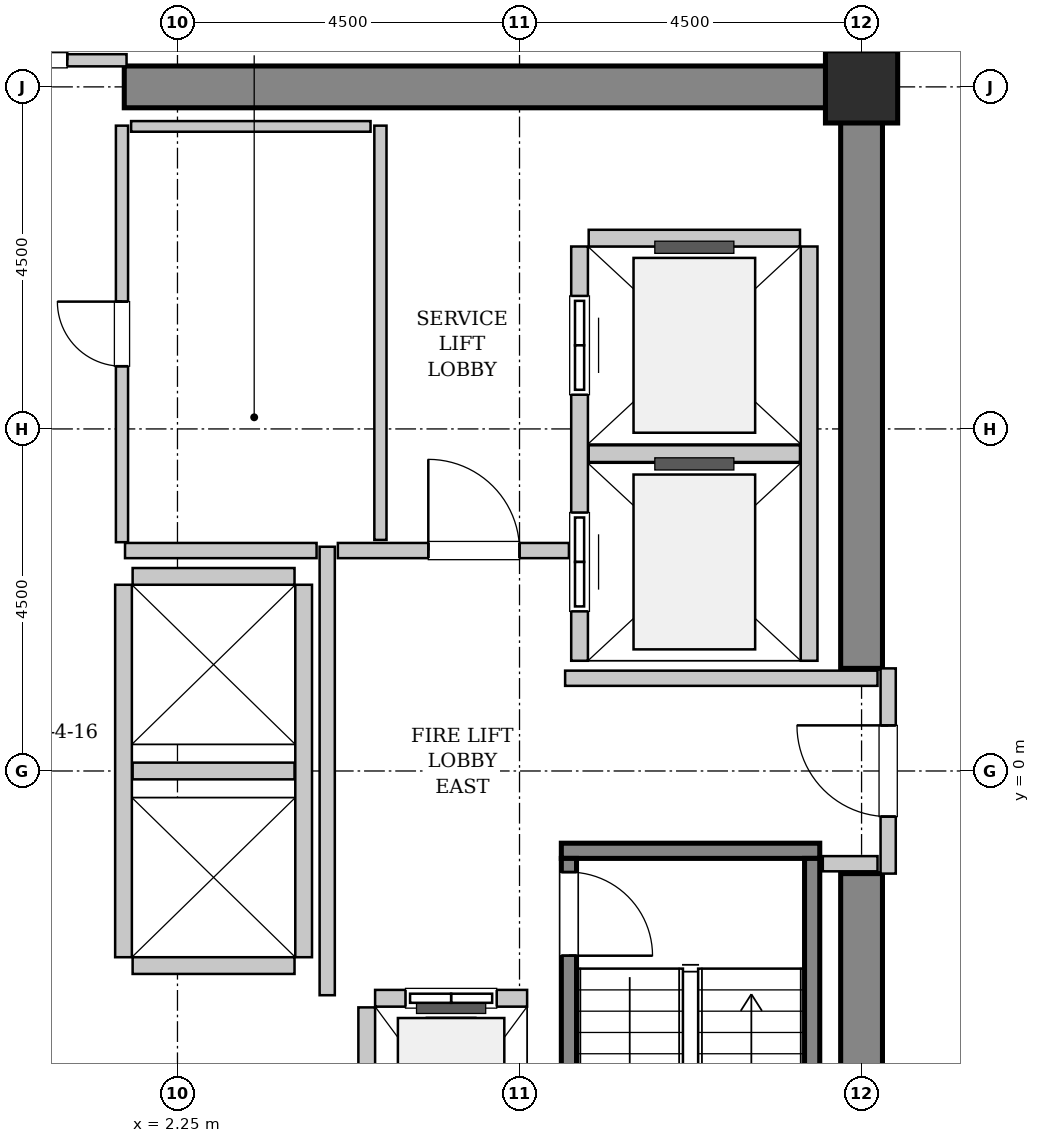
"""IFC4 building model, lengths in metres.
Left out: names, types, materials, properties, quantities, classifications, styles, units other than length and angle.
Written with IfcOpenShell. Run it as: python <this file> out.ifc"""

import sys

from ifc_helpers import new_model, si_unit, direction, frame, frame_2d, origin, origin_2d, place, context, subcontext, project, spatial, rectangle, hollow_rectangle, extrude, source, transform, mapped, element, fill, save


model = new_model("IFC4")
c1 = context("Model", 3, precision=1e-05, world=origin(), true_north=direction((0.0, 1.0)))
c2 = subcontext(c1, "Body", "Model", "MODEL_VIEW")
j1 = project(units=[si_unit("LENGTHUNIT", "METRE"), si_unit("PLANEANGLEUNIT", "RADIAN")], contexts=[c1])
p1 = place(None, origin())
s1 = spatial("IfcSite", under=j1, at=p1, CompositionType="ELEMENT")
p2 = place(p1, origin())
s2 = spatial("IfcBuilding", under=s1, at=p2, CompositionType="ELEMENT")
p3 = place(p2, frame((0.0, 0.0, 175.4)))
s3 = spatial("IfcBuildingStorey", under=s2, at=p3, CompositionType="ELEMENT", Elevation=175.4)
m1 = source(origin(), c2, "Body", "SweptSolid", [
    extrude(rectangle(XDim=9.975, YDim=0.55, at=frame_2d((4.987, 0.0))), origin(), (0.0, 0.0, 1.0), 3.8),
])
p4 = place(p3, frame((1.55, 9.0, 0.0), z_axis=(0.0, 0.0, 1.0), x_axis=(1.0, 0.0, 0.0)))
e1 = element("IfcWall", 1, at=p4, inside=s3, PredefinedType="SHEAR", context=c2, shape_type="MappedRepresentation", body=[
    mapped(m1, transform((0.0, 0.0, 0.0), x_axis=(1.0, 0.0, 0.0), y_axis=(0.0, 1.0, 0.0), z_axis=(0.0, 0.0, 1.0), scale=1.0)),
])
m2 = source(origin(), c2, "Body", "SweptSolid", [
    extrude(rectangle(XDim=7.375, YDim=0.55, at=frame_2d((3.688, 0.0))), origin(), (0.0, 0.0, 1.0), 3.8),
])
for number, where, z_axis, x_axis in (
    (2, (11.25, -8.725, 0.0), (0.0, 0.0, 1.0), (0.0, 1.0, 0.0)),
    (3, (11.25, 1.35, 0.0), (0.0, 0.0, 1.0), (0.0, 1.0, 0.0)),
):
    element("IfcWall", number, at=place(p3, frame(where, z_axis=z_axis, x_axis=x_axis)), inside=s3, PredefinedType="SHEAR", context=c2, shape_type="MappedRepresentation", body=[
        mapped(m2, transform((0.0, 0.0, 0.0), x_axis=(1.0, 0.0, 0.0), y_axis=(0.0, 1.0, 0.0), z_axis=(0.0, 0.0, 1.0), scale=1.0)),
    ])
m3 = source(origin(), c2, "Body", "SweptSolid", [
    extrude(hollow_rectangle(XDim=0.95, YDim=0.95, WallThickness=0.045, InnerFilletRadius=0.045, OuterFilletRadius=0.09, at=origin_2d()), origin(), (0.0, 0.0, 1.0), 3.8),
])
p5 = place(p3, frame((11.25, 9.0, 0.0), z_axis=(0.0, 0.0, 1.0), x_axis=(1.0, 0.0, 0.0)))
e4 = element("IfcColumn", 4, at=p5, inside=s3, PredefinedType="COLUMN", context=c2, shape_type="MappedRepresentation", body=[
    mapped(m3, transform((0.0, 0.0, 0.0), x_axis=(1.0, 0.0, 0.0), y_axis=(0.0, 1.0, 0.0), z_axis=(0.0, 0.0, 1.0), scale=1.0)),
])
m4 = source(origin(), c2, "Body", "SweptSolid", [
    extrude(rectangle(XDim=3.4, YDim=0.2, at=frame_2d((1.7, 0.0))), origin(), (0.0, 0.0, 1.0), 3.8),
])
p6 = place(p3, frame((7.3, -1.05, 0.0), z_axis=(0.0, 0.0, 1.0), x_axis=(1.0, 0.0, 0.0)))
e5 = element("IfcWall", 5, at=p6, inside=s3, PredefinedType="SOLIDWALL", context=c2, shape_type="MappedRepresentation", body=[
    mapped(m4, transform((0.0, 0.0, 0.0), x_axis=(1.0, 0.0, 0.0), y_axis=(0.0, 1.0, 0.0), z_axis=(0.0, 0.0, 1.0), scale=1.0)),
])
m5 = source(origin(), c2, "Body", "SweptSolid", [
    extrude(rectangle(XDim=7.1, YDim=0.2, at=frame_2d((3.55, 0.0))), origin(), (0.0, 0.0, 1.0), 3.8),
])
p7 = place(p3, frame((7.4, -1.15, 0.0), z_axis=(0.0, 0.0, 1.0), x_axis=(0.0, -1.0, 0.0)))
e6 = element("IfcWall", 6, at=p7, inside=s3, PredefinedType="SOLIDWALL", context=c2, shape_type="MappedRepresentation", body=[
    mapped(m5, transform((0.0, 0.0, 0.0), x_axis=(1.0, 0.0, 0.0), y_axis=(0.0, 1.0, 0.0), z_axis=(0.0, 0.0, 1.0), scale=1.0)),
])
p8 = place(p7, frame((0.18, 0.0, 0.0)))
e7 = element("IfcOpeningElement", 7, at=p8, cuts=e6, PredefinedType="OPENING", context=c2, shape_type="SweptSolid", body=[
    extrude(rectangle(XDim=1.1, YDim=2.15, at=frame_2d((0.55, 1.075))), frame((0.0, 0.11, 0.0), z_axis=(0.0, -1.0, 0.0), x_axis=(1.0, 0.0, 0.0)), (0.0, 0.0, 1.0), 0.22),
])
p9 = place(p3, frame((10.6, -1.15, 0.0), z_axis=(0.0, 0.0, 1.0), x_axis=(0.0, -1.0, 0.0)))
e8 = element("IfcWall", 8, at=p9, inside=s3, PredefinedType="SOLIDWALL", context=c2, shape_type="MappedRepresentation", body=[
    mapped(m5, transform((0.0, 0.0, 0.0), x_axis=(1.0, 0.0, 0.0), y_axis=(0.0, 1.0, 0.0), z_axis=(0.0, 0.0, 1.0), scale=1.0)),
])
m6 = source(origin(), c2, "Body", "SweptSolid", [
    extrude(rectangle(XDim=2.0, YDim=0.22, at=frame_2d((1.0, 0.0))), origin(), (0.0, 0.0, 1.0), 3.535),
])
p10 = place(p3, frame((6.85, -2.99, 0.0), z_axis=(0.0, 0.0, 1.0), x_axis=(-1.0, 0.0, 0.0)))
e9 = element("IfcWall", 9, at=p10, inside=s3, PredefinedType="SOLIDWALL", context=c2, shape_type="MappedRepresentation", body=[
    mapped(m6, transform((0.0, 0.0, 0.0), x_axis=(1.0, 0.0, 0.0), y_axis=(0.0, 1.0, 0.0), z_axis=(0.0, 0.0, 1.0), scale=1.0)),
])
p11 = place(p10, frame((0.4, 0.0, 0.0)))
e10 = element("IfcOpeningElement", 10, at=p11, cuts=e9, PredefinedType="OPENING", context=c2, shape_type="SweptSolid", body=[
    extrude(rectangle(XDim=1.2, YDim=2.2, at=frame_2d((0.6, 1.1))), frame((0.0, 0.12, 0.0), z_axis=(0.0, -1.0, 0.0), x_axis=(1.0, 0.0, 0.0)), (0.0, 0.0, 1.0), 0.24),
])
m7 = source(origin(), c2, "Body", "SweptSolid", [
    extrude(rectangle(XDim=2.68, YDim=0.22, at=frame_2d((1.34, 0.0))), origin(), (0.0, 0.0, 1.0), 3.535),
])
p12 = place(p3, frame((4.74, -3.11, 0.0), z_axis=(0.0, 0.0, 1.0), x_axis=(0.0, -1.0, 0.0)))
e11 = element("IfcWall", 11, at=p12, inside=s3, PredefinedType="SOLIDWALL", context=c2, shape_type="MappedRepresentation", body=[
    mapped(m7, transform((0.0, 0.0, 0.0), x_axis=(1.0, 0.0, 0.0), y_axis=(0.0, 1.0, 0.0), z_axis=(0.0, 0.0, 1.0), scale=1.0)),
])
m8 = source(origin(), c2, "Body", "SweptSolid", [
    extrude(rectangle(XDim=5.45, YDim=0.22, at=frame_2d((2.725, 0.0))), origin(), (0.0, 0.0, 1.0), 3.535),
])
p13 = place(p3, frame((7.54, 6.9, 0.0), z_axis=(0.0, 0.0, 1.0), x_axis=(0.0, -1.0, 0.0)))
e12 = element("IfcWall", 12, at=p13, inside=s3, PredefinedType="SOLIDWALL", context=c2, shape_type="MappedRepresentation", body=[
    mapped(m8, transform((0.0, 0.0, 0.0), x_axis=(1.0, 0.0, 0.0), y_axis=(0.0, 1.0, 0.0), z_axis=(0.0, 0.0, 1.0), scale=1.0)),
])
p14 = place(p13, frame((3.5, 0.0, 0.0)))
e13 = element("IfcOpeningElement", 13, at=p14, cuts=e12, PredefinedType="OPENING", context=c2, shape_type="SweptSolid", body=[
    extrude(rectangle(XDim=1.3, YDim=2.3, at=frame_2d((0.65, 1.15))), frame((0.0, 0.12, 0.0), z_axis=(0.0, -1.0, 0.0), x_axis=(1.0, 0.0, 0.0)), (0.0, 0.0, 1.0), 0.24),
])
p15 = place(p13, frame((0.65, 0.0, 0.0)))
e14 = element("IfcOpeningElement", 14, at=p15, cuts=e12, PredefinedType="OPENING", context=c2, shape_type="SweptSolid", body=[
    extrude(rectangle(XDim=1.3, YDim=2.3, at=frame_2d((0.65, 1.15))), frame((0.0, 0.12, 0.0), z_axis=(0.0, -1.0, 0.0), x_axis=(1.0, 0.0, 0.0)), (0.0, 0.0, 1.0), 0.24),
])
p16 = place(p3, frame((10.56, 1.45, 0.0), z_axis=(0.0, 0.0, 1.0), x_axis=(0.0, 1.0, 0.0)))
e15 = element("IfcWall", 15, at=p16, inside=s3, PredefinedType="SOLIDWALL", context=c2, shape_type="MappedRepresentation", body=[
    mapped(m8, transform((0.0, 0.0, 0.0), x_axis=(1.0, 0.0, 0.0), y_axis=(0.0, 1.0, 0.0), z_axis=(0.0, 0.0, 1.0), scale=1.0)),
])
m9 = source(origin(), c2, "Body", "SweptSolid", [
    extrude(rectangle(XDim=2.78, YDim=0.22, at=frame_2d((1.39, 0.0))), origin(), (0.0, 0.0, 1.0), 3.535),
])
for number, where, z_axis, x_axis in (
    (16, (7.66, 4.175, 0.0), (0.0, 0.0, 1.0), (1.0, 0.0, 0.0)),
    (17, (10.44, 7.01, 0.0), (0.0, 0.0, 1.0), (-1.0, 0.0, 0.0)),
):
    element("IfcWall", number, at=place(p3, frame(where, z_axis=z_axis, x_axis=x_axis)), inside=s3, PredefinedType="SOLIDWALL", context=c2, shape_type="MappedRepresentation", body=[
        mapped(m9, transform((0.0, 0.0, 0.0), x_axis=(1.0, 0.0, 0.0), y_axis=(0.0, 1.0, 0.0), z_axis=(0.0, 0.0, 1.0), scale=1.0)),
    ])
m10 = source(origin(), c2, "Body", "SweptSolid", [
    extrude(rectangle(XDim=4.9, YDim=0.22, at=frame_2d((2.45, 0.0))), origin(), (0.0, 0.0, 1.0), 3.535),
])
for number, where, z_axis, x_axis in (
    (18, (1.54, 2.45, 0.0), (0.0, 0.0, 1.0), (0.0, -1.0, 0.0)),
    (19, (3.91, -2.45, 0.0), (0.0, 0.0, 1.0), (0.0, 1.0, 0.0)),
):
    element("IfcWall", number, at=place(p3, frame(where, z_axis=z_axis, x_axis=x_axis)), inside=s3, PredefinedType="SOLIDWALL", context=c2, shape_type="MappedRepresentation", body=[
        mapped(m10, transform((0.0, 0.0, 0.0), x_axis=(1.0, 0.0, 0.0), y_axis=(0.0, 1.0, 0.0), z_axis=(0.0, 0.0, 1.0), scale=1.0)),
    ])
m11 = source(origin(), c2, "Body", "SweptSolid", [
    extrude(rectangle(XDim=2.13, YDim=0.22, at=frame_2d((1.065, 0.0))), origin(), (0.0, 0.0, 1.0), 3.535),
])
for number, where, z_axis, x_axis in (
    (20, (1.66, -2.56, 0.0), (0.0, 0.0, 1.0), (1.0, 0.0, 0.0)),
    (21, (1.66, 0.0, 0.0), (0.0, 0.0, 1.0), (1.0, 0.0, 0.0)),
    (22, (3.79, 2.56, 0.0), (0.0, 0.0, 1.0), (-1.0, 0.0, 0.0)),
):
    element("IfcWall", number, at=place(p3, frame(where, z_axis=z_axis, x_axis=x_axis)), inside=s3, PredefinedType="SOLIDWALL", context=c2, shape_type="MappedRepresentation", body=[
        mapped(m11, transform((0.0, 0.0, 0.0), x_axis=(1.0, 0.0, 0.0), y_axis=(0.0, 1.0, 0.0), z_axis=(0.0, 0.0, 1.0), scale=1.0)),
    ])
m12 = source(origin(), c2, "Body", "SweptSolid", [
    extrude(rectangle(XDim=2.7, YDim=0.2, at=frame_2d((1.35, 0.0))), origin(), (0.0, 0.0, 1.0), 2.425),
])
p17 = place(p3, frame((11.6, -1.35, 0.0), z_axis=(0.0, 0.0, 1.0), x_axis=(0.0, 1.0, 0.0)))
e23 = element("IfcWall", 23, at=p17, inside=s3, PredefinedType="PARTITIONING", context=c2, shape_type="MappedRepresentation", body=[
    mapped(m12, transform((0.0, 0.0, 0.0), x_axis=(1.0, 0.0, 0.0), y_axis=(0.0, 1.0, 0.0), z_axis=(0.0, 0.0, 1.0), scale=1.0)),
])
p18 = place(p17, frame((0.75, 0.0, 0.0)))
e24 = element("IfcOpeningElement", 24, at=p18, cuts=e23, PredefinedType="OPENING", context=c2, shape_type="SweptSolid", body=[
    extrude(rectangle(XDim=1.2, YDim=2.15, at=frame_2d((0.6, 1.075))), frame((0.0, 0.11, 0.0), z_axis=(0.0, -1.0, 0.0), x_axis=(1.0, 0.0, 0.0)), (0.0, 0.0, 1.0), 0.22),
])
m13 = source(origin(), c2, "Body", "SweptSolid", [
    extrude(rectangle(XDim=5.9, YDim=0.2, at=frame_2d((2.95, 0.0))), origin(), (0.0, 0.0, 1.0), 3.535),
])
p19 = place(p3, frame((4.22, -2.95, 0.0), z_axis=(0.0, 0.0, 1.0), x_axis=(0.0, 1.0, 0.0)))
e25 = element("IfcWall", 25, at=p19, inside=s3, PredefinedType="PARTITIONING", context=c2, shape_type="MappedRepresentation", body=[
    mapped(m13, transform((0.0, 0.0, 0.0), x_axis=(1.0, 0.0, 0.0), y_axis=(0.0, 1.0, 0.0), z_axis=(0.0, 0.0, 1.0), scale=1.0)),
])
m14 = source(origin(), c2, "Body", "SweptSolid", [
    extrude(rectangle(XDim=2.52, YDim=0.2, at=frame_2d((1.26, 0.0))), origin(), (0.0, 0.0, 1.0), 3.535),
])
p20 = place(p3, frame((1.56, 2.9, 0.0), z_axis=(0.0, 0.0, 1.0), x_axis=(1.0, 0.0, 0.0)))
e26 = element("IfcWall", 26, at=p20, inside=s3, PredefinedType="PARTITIONING", context=c2, shape_type="MappedRepresentation", body=[
    mapped(m14, transform((0.0, 0.0, 0.0), x_axis=(1.0, 0.0, 0.0), y_axis=(0.0, 1.0, 0.0), z_axis=(0.0, 0.0, 1.0), scale=1.0)),
])
m15 = source(origin(), c2, "Body", "SweptSolid", [
    extrude(rectangle(XDim=3.04, YDim=0.2, at=frame_2d((1.52, 0.0))), origin(), (0.0, 0.0, 1.0), 3.535),
])
p21 = place(p3, frame((4.36, 2.9, 0.0), z_axis=(0.0, 0.0, 1.0), x_axis=(1.0, 0.0, 0.0)))
e27 = element("IfcWall", 27, at=p21, inside=s3, PredefinedType="PARTITIONING", context=c2, shape_type="MappedRepresentation", body=[
    mapped(m15, transform((0.0, 0.0, 0.0), x_axis=(1.0, 0.0, 0.0), y_axis=(0.0, 1.0, 0.0), z_axis=(0.0, 0.0, 1.0), scale=1.0)),
])
p22 = place(p21, frame((1.19, 0.0, 0.0)))
e28 = element("IfcOpeningElement", 28, at=p22, cuts=e27, PredefinedType="OPENING", context=c2, shape_type="SweptSolid", body=[
    extrude(rectangle(XDim=1.2, YDim=2.15, at=frame_2d((0.6, 1.075))), frame((0.0, 0.11, 0.0), z_axis=(0.0, -1.0, 0.0), x_axis=(1.0, 0.0, 0.0)), (0.0, 0.0, 1.0), 0.22),
])
m16 = source(origin(), c2, "Body", "SweptSolid", [
    extrude(rectangle(XDim=4.11, YDim=0.2, at=frame_2d((2.055, 0.0))), origin(), (0.0, 0.0, 1.0), 3.535),
])
p23 = place(p3, frame((7.35, 1.22, 0.0), z_axis=(0.0, 0.0, 1.0), x_axis=(1.0, 0.0, 0.0)))
e29 = element("IfcWall", 29, at=p23, inside=s3, PredefinedType="PARTITIONING", context=c2, shape_type="MappedRepresentation", body=[
    mapped(m16, transform((0.0, 0.0, 0.0), x_axis=(1.0, 0.0, 0.0), y_axis=(0.0, 1.0, 0.0), z_axis=(0.0, 0.0, 1.0), scale=1.0)),
])
m17 = source(origin(), c2, "Body", "SweptSolid", [
    extrude(rectangle(XDim=0.72, YDim=0.2, at=frame_2d((0.36, 0.0))), origin(), (0.0, 0.0, 1.0), 3.535),
])
p24 = place(p3, frame((10.74, -1.22, 0.0), z_axis=(0.0, 0.0, 1.0), x_axis=(1.0, 0.0, 0.0)))
e30 = element("IfcWall", 30, at=p24, inside=s3, PredefinedType="PARTITIONING", context=c2, shape_type="MappedRepresentation", body=[
    mapped(m17, transform((0.0, 0.0, 0.0), x_axis=(1.0, 0.0, 0.0), y_axis=(0.0, 1.0, 0.0), z_axis=(0.0, 0.0, 1.0), scale=1.0)),
])
m18 = source(origin(), c2, "Body", "SweptSolid", [
    extrude(rectangle(XDim=3.16, YDim=0.16, at=frame_2d((1.58, 0.0))), origin(), (0.0, 0.0, 1.0), 2.425),
])
p25 = place(p3, frame((-1.58, 9.35, 0.0), z_axis=(0.0, 0.0, 1.0), x_axis=(1.0, 0.0, 0.0)))
e31 = element("IfcWall", 31, at=p25, inside=s3, PredefinedType="PARTITIONING", context=c2, shape_type="MappedRepresentation", body=[
    mapped(m18, transform((0.0, 0.0, 0.0), x_axis=(1.0, 0.0, 0.0), y_axis=(0.0, 1.0, 0.0), z_axis=(0.0, 0.0, 1.0), scale=1.0)),
])
p26 = place(p25, frame((0.78, 0.0, 0.0)))
e32 = element("IfcOpeningElement", 32, at=p26, cuts=e31, PredefinedType="OPENING", context=c2, shape_type="SweptSolid", body=[
    extrude(rectangle(XDim=1.6, YDim=2.3, at=frame_2d((0.8, 1.15))), frame((0.0, 0.09, 0.0), z_axis=(0.0, -1.0, 0.0), x_axis=(1.0, 0.0, 0.0)), (0.0, 0.0, 1.0), 0.18),
])
m19 = source(origin(), c2, "Body", "SweptSolid", [
    extrude(rectangle(XDim=5.45, YDim=0.16, at=frame_2d((2.725, 0.0))), origin(), (0.0, 0.0, 1.0), 3.535),
])
p27 = place(p3, frame((4.92, 3.04, 0.0), z_axis=(0.0, 0.0, 1.0), x_axis=(0.0, 1.0, 0.0)))
e33 = element("IfcWall", 33, at=p27, inside=s3, PredefinedType="PARTITIONING", context=c2, shape_type="MappedRepresentation", body=[
    mapped(m19, transform((0.0, 0.0, 0.0), x_axis=(1.0, 0.0, 0.0), y_axis=(0.0, 1.0, 0.0), z_axis=(0.0, 0.0, 1.0), scale=1.0)),
])
m20 = source(origin(), c2, "Body", "SweptSolid", [
    extrude(rectangle(XDim=5.48, YDim=0.16, at=frame_2d((2.74, 0.0))), origin(), (0.0, 0.0, 1.0), 3.535),
])
p28 = place(p3, frame((1.52, 3.01, 0.0), z_axis=(0.0, 0.0, 1.0), x_axis=(0.0, 1.0, 0.0)))
e34 = element("IfcWall", 34, at=p28, inside=s3, PredefinedType="PARTITIONING", context=c2, shape_type="MappedRepresentation", body=[
    mapped(m20, transform((0.0, 0.0, 0.0), x_axis=(1.0, 0.0, 0.0), y_axis=(0.0, 1.0, 0.0), z_axis=(0.0, 0.0, 1.0), scale=1.0)),
])
p29 = place(p28, frame((2.315, 0.0, 0.0)))
e35 = element("IfcOpeningElement", 35, at=p29, cuts=e34, PredefinedType="OPENING", context=c2, shape_type="SweptSolid", body=[
    extrude(rectangle(XDim=0.85, YDim=2.1, at=frame_2d((0.425, 1.05))), frame((0.0, 0.09, 0.0), z_axis=(0.0, -1.0, 0.0), x_axis=(1.0, 0.0, 0.0)), (0.0, 0.0, 1.0), 0.18),
])
m21 = source(origin(), c2, "Body", "SweptSolid", [
    extrude(rectangle(XDim=3.15, YDim=0.14, at=frame_2d((1.575, 0.0))), origin(), (0.0, 0.0, 1.0), 3.535),
])
p30 = place(p3, frame((1.64, 8.48, 0.0), z_axis=(0.0, 0.0, 1.0), x_axis=(1.0, 0.0, 0.0)))
e36 = element("IfcWall", 36, at=p30, inside=s3, PredefinedType="PARTITIONING", context=c2, shape_type="MappedRepresentation", body=[
    mapped(m21, transform((0.0, 0.0, 0.0), x_axis=(1.0, 0.0, 0.0), y_axis=(0.0, 1.0, 0.0), z_axis=(0.0, 0.0, 1.0), scale=1.0)),
])
m22 = source(origin(), c2, "Body", "SweptSolid", [
    extrude(rectangle(XDim=1.1, YDim=2.15, at=frame_2d((0.55, 1.075))), frame((0.0, 0.025, 0.0), z_axis=(0.0, -1.0, 0.0), x_axis=(1.0, 0.0, 0.0)), (0.0, 0.0, 1.0), 0.05),
])
p31 = place(p8, origin())
e37 = element("IfcDoor", 37, at=p31, inside=s3, OperationType="SINGLE_SWING_RIGHT", PredefinedType="DOOR", context=c2, shape_type="MappedRepresentation", body=[
    mapped(m22, transform((0.0, 0.0, 0.0), x_axis=(1.0, 0.0, 0.0), y_axis=(0.0, 1.0, 0.0), z_axis=(0.0, 0.0, 1.0), scale=1.0)),
])
fill(e7, e37)
m23 = source(origin(), c2, "Body", "SweptSolid", [
    extrude(rectangle(XDim=1.2, YDim=2.2, at=frame_2d((0.6, 1.1))), frame((0.0, 0.025, 0.0), z_axis=(0.0, -1.0, 0.0), x_axis=(1.0, 0.0, 0.0)), (0.0, 0.0, 1.0), 0.05),
])
p32 = place(p11, origin())
e38 = element("IfcDoor", 38, at=p32, inside=s3, OperationType="SLIDING_TO_LEFT", PredefinedType="DOOR", context=c2, shape_type="MappedRepresentation", body=[
    mapped(m23, transform((0.0, 0.0, 0.0), x_axis=(1.0, 0.0, 0.0), y_axis=(0.0, 1.0, 0.0), z_axis=(0.0, 0.0, 1.0), scale=1.0)),
])
fill(e10, e38)
m24 = source(origin(), c2, "Body", "SweptSolid", [
    extrude(rectangle(XDim=1.3, YDim=2.3, at=frame_2d((0.65, 1.15))), frame((0.0, 0.025, 0.0), z_axis=(0.0, -1.0, 0.0), x_axis=(1.0, 0.0, 0.0)), (0.0, 0.0, 1.0), 0.05),
])
p33 = place(p14, origin())
e39 = element("IfcDoor", 39, at=p33, inside=s3, OperationType="SLIDING_TO_RIGHT", PredefinedType="DOOR", context=c2, shape_type="MappedRepresentation", body=[
    mapped(m24, transform((0.0, 0.0, 0.0), x_axis=(1.0, 0.0, 0.0), y_axis=(0.0, 1.0, 0.0), z_axis=(0.0, 0.0, 1.0), scale=1.0)),
])
fill(e13, e39)
p34 = place(p15, origin())
e40 = element("IfcDoor", 40, at=p34, inside=s3, OperationType="SLIDING_TO_RIGHT", PredefinedType="DOOR", context=c2, shape_type="MappedRepresentation", body=[
    mapped(m24, transform((0.0, 0.0, 0.0), x_axis=(1.0, 0.0, 0.0), y_axis=(0.0, 1.0, 0.0), z_axis=(0.0, 0.0, 1.0), scale=1.0)),
])
fill(e14, e40)
m25 = source(origin(), c2, "Body", "SweptSolid", [
    extrude(rectangle(XDim=1.2, YDim=2.15, at=frame_2d((0.6, 1.075))), frame((0.0, 0.025, 0.0), z_axis=(0.0, -1.0, 0.0), x_axis=(1.0, 0.0, 0.0)), (0.0, 0.0, 1.0), 0.05),
])
p35 = place(p18, origin())
e41 = element("IfcDoor", 41, at=p35, inside=s3, OperationType="SINGLE_SWING_RIGHT", PredefinedType="DOOR", context=c2, shape_type="MappedRepresentation", body=[
    mapped(m25, transform((0.0, 0.0, 0.0), x_axis=(1.0, 0.0, 0.0), y_axis=(0.0, 1.0, 0.0), z_axis=(0.0, 0.0, 1.0), scale=1.0)),
])
fill(e24, e41)
p36 = place(p22, origin())
e42 = element("IfcDoor", 42, at=p36, inside=s3, OperationType="SINGLE_SWING_LEFT", PredefinedType="DOOR", context=c2, shape_type="MappedRepresentation", body=[
    mapped(m25, transform((0.0, 0.0, 0.0), x_axis=(1.0, 0.0, 0.0), y_axis=(0.0, 1.0, 0.0), z_axis=(0.0, 0.0, 1.0), scale=1.0)),
])
fill(e28, e42)
m26 = source(origin(), c2, "Body", "SweptSolid", [
    extrude(rectangle(XDim=1.6, YDim=2.3, at=frame_2d((0.8, 1.15))), frame((0.0, 0.025, 0.0), z_axis=(0.0, -1.0, 0.0), x_axis=(1.0, 0.0, 0.0)), (0.0, 0.0, 1.0), 0.05),
])
p37 = place(p26, origin())
e43 = element("IfcDoor", 43, at=p37, inside=s3, OperationType="DOUBLE_DOOR_SINGLE_SWING", PredefinedType="DOOR", context=c2, shape_type="MappedRepresentation", body=[
    mapped(m26, transform((0.0, 0.0, 0.0), x_axis=(1.0, 0.0, 0.0), y_axis=(0.0, 1.0, 0.0), z_axis=(0.0, 0.0, 1.0), scale=1.0)),
])
fill(e32, e43)
m27 = source(origin(), c2, "Body", "SweptSolid", [
    extrude(rectangle(XDim=0.85, YDim=2.1, at=frame_2d((0.425, 1.05))), frame((0.0, 0.025, 0.0), z_axis=(0.0, -1.0, 0.0), x_axis=(1.0, 0.0, 0.0)), (0.0, 0.0, 1.0), 0.05),
])
p38 = place(p29, origin())
e44 = element("IfcDoor", 44, at=p38, inside=s3, OperationType="SINGLE_SWING_RIGHT", PredefinedType="DOOR", context=c2, shape_type="MappedRepresentation", body=[
    mapped(m27, transform((0.0, 0.0, 0.0), x_axis=(1.0, 0.0, 0.0), y_axis=(0.0, 1.0, 0.0), z_axis=(0.0, 0.0, 1.0), scale=1.0)),
])
fill(e35, e44)
save(model, sys.argv[1])
